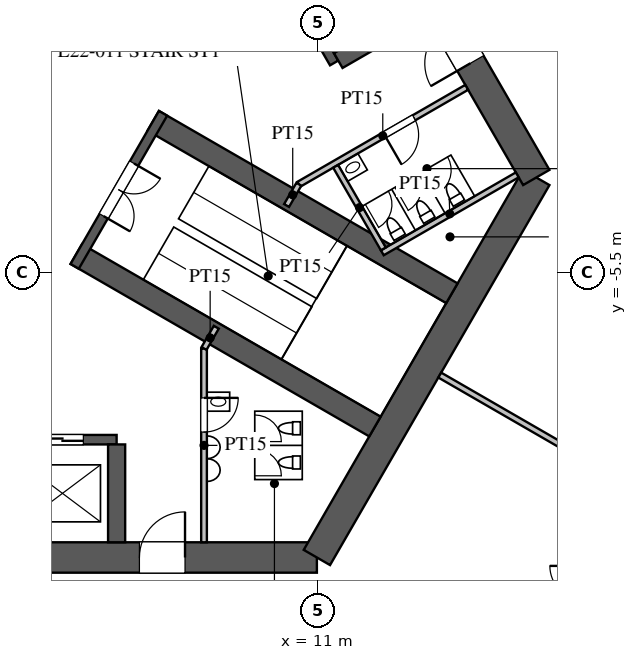
"""IFC4 building model, lengths in metres.
Left out: names, types, materials, properties, quantities, classifications, styles, units other than length and angle.
Written with IfcOpenShell. Run it as: python <this file> out.ifc"""

import sys

from ifc_helpers import new_model, si_unit, direction, frame, frame_2d, origin, place, context, subcontext, project, spatial, rectangle, extrude, element, fill, save


model = new_model("IFC4")
c1 = context("Model", 3, precision=1e-05, world=origin(), true_north=direction((0.0, 1.0)))
c2 = subcontext(c1, "Body", "Model", "MODEL_VIEW")
j1 = project(units=[si_unit("LENGTHUNIT", "METRE"), si_unit("PLANEANGLEUNIT", "RADIAN")], contexts=[c1])
p1 = place(None, origin())
s1 = spatial("IfcSite", under=j1, at=p1, CompositionType="ELEMENT")
p2 = place(p1, origin())
s2 = spatial("IfcBuilding", under=s1, at=p2, CompositionType="ELEMENT")
p3 = place(p2, frame((0.0, 0.0, 98.1)))
s3 = spatial("IfcBuildingStorey", under=s2, at=p3, CompositionType="ELEMENT", Elevation=98.1)
p4 = place(p3, frame((-10.97, -13.0, 0.0), z_axis=(0.0, 0.0, 1.0), x_axis=(1.0, 0.0, 0.0)))
e1 = element("IfcWall", 1, at=p4, inside=s3, PredefinedType="SHEAR", context=c2, shape_type="SweptSolid", body=[
    extrude(rectangle(XDim=21.939, YDim=0.8, at=frame_2d((10.97, 0.0))), origin(), (0.0, 0.0, 1.0), 5.0),
])
p5 = place(p4, frame((17.27, 0.0, 0.0)))
e2 = element("IfcOpeningElement", 2, at=p5, cuts=e1, PredefinedType="OPENING", context=c2, shape_type="SweptSolid", body=[
    extrude(rectangle(XDim=1.2, YDim=2.1, at=frame_2d((0.6, 1.05))), frame((0.0, 0.41, 0.0), z_axis=(0.0, -1.0, 0.0), x_axis=(1.0, 0.0, 0.0)), (0.0, 0.0, 1.0), 0.82),
])
p6 = place(p4, frame((3.47, 0.0, 0.0)))
e3 = element("IfcOpeningElement", 3, at=p6, cuts=e1, PredefinedType="OPENING", context=c2, shape_type="SweptSolid", body=[
    extrude(rectangle(XDim=1.2, YDim=2.1, at=frame_2d((0.6, 1.05))), frame((0.0, 0.41, 0.0), z_axis=(0.0, -1.0, 0.0), x_axis=(1.0, 0.0, 0.0)), (0.0, 0.0, 1.0), 0.82),
])
p7 = place(p3, frame((10.97, -13.0, 0.0), z_axis=(0.0, 0.0, 1.0), x_axis=(0.499995765644, 0.866027848477, 0.0)))
e4 = element("IfcWall", 4, at=p7, inside=s3, PredefinedType="SHEAR", context=c2, shape_type="SweptSolid", body=[
    extrude(rectangle(XDim=11.547, YDim=0.8, at=frame_2d((5.773, 0.0))), origin(), (0.0, 0.0, 1.0), 5.0),
])
p8 = place(p3, frame((16.743, -3.0, 0.0), z_axis=(0.0, 0.0, 1.0), x_axis=(-0.500002442456, 0.866023993627, 0.0)))
e5 = element("IfcWall", 5, at=p8, inside=s3, PredefinedType="SHEAR", context=c2, shape_type="SweptSolid", body=[
    extrude(rectangle(XDim=21.939, YDim=0.8, at=frame_2d((10.97, 0.0))), origin(), (0.0, 0.0, 1.0), 5.0),
])
p9 = place(p8, frame((17.27, 0.0, 0.0)))
e6 = element("IfcOpeningElement", 6, at=p9, cuts=e5, PredefinedType="OPENING", context=c2, shape_type="SweptSolid", body=[
    extrude(rectangle(XDim=1.2, YDim=2.1, at=frame_2d((0.6, 1.05))), frame((0.0, 0.41, 0.0), z_axis=(0.0, -1.0, 0.0), x_axis=(1.0, 0.0, 0.0)), (0.0, 0.0, 1.0), 0.82),
])
p10 = place(p8, frame((3.47, 0.0, 0.0)))
e7 = element("IfcOpeningElement", 7, at=p10, cuts=e5, PredefinedType="OPENING", context=c2, shape_type="SweptSolid", body=[
    extrude(rectangle(XDim=1.2, YDim=2.1, at=frame_2d((0.6, 1.05))), frame((0.0, 0.41, 0.0), z_axis=(0.0, -1.0, 0.0), x_axis=(1.0, 0.0, 0.0)), (0.0, 0.0, 1.0), 0.82),
])
p11 = place(p3, frame((-5.7, -9.9, 0.0), z_axis=(0.0, 0.0, 1.0), x_axis=(1.0, 0.0, 0.0)))
e8 = element("IfcWall", 8, at=p11, inside=s3, PredefinedType="SHEAR", context=c2, shape_type="SweptSolid", body=[
    extrude(rectangle(XDim=11.4, YDim=0.25, at=frame_2d((5.7, 0.0))), origin(), (0.0, 0.0, 1.0), 5.0),
])
p12 = place(p11, frame((0.875, 0.0, 0.0)))
e9 = element("IfcOpeningElement", 9, at=p12, cuts=e8, PredefinedType="OPENING", context=c2, shape_type="SweptSolid", body=[
    extrude(rectangle(XDim=1.1, YDim=2.2, at=frame_2d((0.55, 1.1))), frame((0.0, 0.135, 0.0), z_axis=(0.0, -1.0, 0.0), x_axis=(1.0, 0.0, 0.0)), (0.0, 0.0, 1.0), 0.27),
])
p13 = place(p11, frame((3.725, 0.0, 0.0)))
e10 = element("IfcOpeningElement", 10, at=p13, cuts=e8, PredefinedType="OPENING", context=c2, shape_type="SweptSolid", body=[
    extrude(rectangle(XDim=1.1, YDim=2.2, at=frame_2d((0.55, 1.1))), frame((0.0, 0.135, 0.0), z_axis=(0.0, -1.0, 0.0), x_axis=(1.0, 0.0, 0.0)), (0.0, 0.0, 1.0), 0.27),
])
p14 = place(p11, frame((6.575, 0.0, 0.0)))
e11 = element("IfcOpeningElement", 11, at=p14, cuts=e8, PredefinedType="OPENING", context=c2, shape_type="SweptSolid", body=[
    extrude(rectangle(XDim=1.1, YDim=2.2, at=frame_2d((0.55, 1.1))), frame((0.0, 0.135, 0.0), z_axis=(0.0, -1.0, 0.0), x_axis=(1.0, 0.0, 0.0)), (0.0, 0.0, 1.0), 0.27),
])
p15 = place(p11, frame((9.425, 0.0, 0.0)))
e12 = element("IfcOpeningElement", 12, at=p15, cuts=e8, PredefinedType="OPENING", context=c2, shape_type="SweptSolid", body=[
    extrude(rectangle(XDim=1.1, YDim=2.2, at=frame_2d((0.55, 1.1))), frame((0.0, 0.135, 0.0), z_axis=(0.0, -1.0, 0.0), x_axis=(1.0, 0.0, 0.0)), (0.0, 0.0, 1.0), 0.27),
])
p16 = place(p3, frame((5.7, -10.025, 0.0), z_axis=(0.0, 0.0, 1.0), x_axis=(0.0, -1.0, 0.0)))
e13 = element("IfcWall", 13, at=p16, inside=s3, PredefinedType="SHEAR", context=c2, shape_type="SweptSolid", body=[
    extrude(rectangle(XDim=2.575, YDim=0.45, at=frame_2d((1.288, 0.0))), origin(), (0.0, 0.0, 1.0), 5.0),
])
p17 = place(p3, frame((11.424, 0.014, 0.0), z_axis=(0.0, 0.0, 1.0), x_axis=(-0.500001763848, 0.866024385424, 0.0)))
e14 = element("IfcWall", 14, at=p17, inside=s3, PredefinedType="SHEAR", context=c2, shape_type="SweptSolid", body=[
    extrude(rectangle(XDim=11.4, YDim=0.25, at=frame_2d((5.7, 0.0))), origin(), (0.0, 0.0, 1.0), 5.0),
])
p18 = place(p17, frame((0.875, 0.0, 0.0)))
e15 = element("IfcOpeningElement", 15, at=p18, cuts=e14, PredefinedType="OPENING", context=c2, shape_type="SweptSolid", body=[
    extrude(rectangle(XDim=1.1, YDim=2.2, at=frame_2d((0.55, 1.1))), frame((0.0, 0.135, 0.0), z_axis=(0.0, -1.0, 0.0), x_axis=(1.0, 0.0, 0.0)), (0.0, 0.0, 1.0), 0.27),
])
p19 = place(p17, frame((3.725, 0.0, 0.0)))
e16 = element("IfcOpeningElement", 16, at=p19, cuts=e14, PredefinedType="OPENING", context=c2, shape_type="SweptSolid", body=[
    extrude(rectangle(XDim=1.1, YDim=2.2, at=frame_2d((0.55, 1.1))), frame((0.0, 0.135, 0.0), z_axis=(0.0, -1.0, 0.0), x_axis=(1.0, 0.0, 0.0)), (0.0, 0.0, 1.0), 0.27),
])
p20 = place(p3, frame((11.532, 0.076, 0.0), z_axis=(0.0, 0.0, 1.0), x_axis=(0.866005588531, 0.500034319456, 0.0)))
e17 = element("IfcWall", 17, at=p20, inside=s3, PredefinedType="SHEAR", context=c2, shape_type="SweptSolid", body=[
    extrude(rectangle(XDim=2.575, YDim=0.45, at=frame_2d((1.288, 0.0))), origin(), (0.0, 0.0, 1.0), 5.0),
])
for number, where, z_axis, x_axis in (
    (18, (4.638, -5.016, 0.0), (0.0, 0.0, 1.0), (0.866, -0.5, 0.0)),
    (19, (6.663, -1.509, 0.0), (0.0, 0.0, 1.0), (0.866, -0.5, 0.0)),
):
    element("IfcWall", number, at=place(p3, frame(where, z_axis=z_axis, x_axis=x_axis)), inside=s3, PredefinedType="SHEAR", context=c2, shape_type="SweptSolid", body=[
        extrude(rectangle(XDim=9.075, YDim=0.6, at=frame_2d((4.538, 0.0))), origin(), (0.0, 0.0, 1.0), 5.0),
    ])
p21 = place(p3, frame((4.597, -5.339, 0.0), z_axis=(0.0, 0.0, 1.0), x_axis=(0.499984536904, 0.866034331223, 0.0)))
e20 = element("IfcWall", 20, at=p21, inside=s3, PredefinedType="SHEAR", context=c2, shape_type="SweptSolid", body=[
    extrude(rectangle(XDim=4.65, YDim=0.25, at=frame_2d((2.325, 0.0))), origin(), (0.0, 0.0, 1.0), 5.0),
])
p22 = place(p21, frame((1.525, 0.0, 0.0)))
e21 = element("IfcOpeningElement", 21, at=p22, cuts=e20, PredefinedType="OPENING", context=c2, shape_type="SweptSolid", body=[
    extrude(rectangle(XDim=1.6, YDim=2.1, at=frame_2d((0.8, 1.05))), frame((0.0, 0.135, 0.0), z_axis=(0.0, -1.0, 0.0), x_axis=(1.0, 0.0, 0.0)), (0.0, 0.0, 1.0), 0.27),
])
p23 = place(p3, frame((8.0, -7.5, 0.0), z_axis=(0.0, 0.0, 1.0), x_axis=(0.0, -1.0, 0.0)))
e22 = element("IfcWall", 22, at=p23, inside=s3, PredefinedType="PARTITIONING", context=c2, shape_type="SweptSolid", body=[
    extrude(rectangle(XDim=5.1, YDim=0.15, at=frame_2d((2.55, 0.0))), origin(), (0.0, 0.0, 1.0), 4.8),
])
p24 = place(p23, frame((1.3, 0.0, 0.0)))
e23 = element("IfcOpeningElement", 23, at=p24, cuts=e22, PredefinedType="OPENING", context=c2, shape_type="SweptSolid", body=[
    extrude(rectangle(XDim=0.9, YDim=2.1, at=frame_2d((0.45, 1.05))), frame((0.0, 0.085, 0.0), z_axis=(0.0, -1.0, 0.0), x_axis=(1.0, 0.0, 0.0)), (0.0, 0.0, 1.0), 0.17),
])
p25 = place(p3, frame((10.495, -3.178, 0.0), z_axis=(0.0, 0.0, 1.0), x_axis=(0.86602216432, 0.500005610874, 0.0)))
e24 = element("IfcWall", 24, at=p25, inside=s3, PredefinedType="PARTITIONING", context=c2, shape_type="SweptSolid", body=[
    extrude(rectangle(XDim=5.1, YDim=0.15, at=frame_2d((2.55, 0.0))), origin(), (0.0, 0.0, 1.0), 4.8),
])
p26 = place(p25, frame((2.6, 0.0, 0.0)))
e25 = element("IfcOpeningElement", 25, at=p26, cuts=e24, PredefinedType="OPENING", context=c2, shape_type="SweptSolid", body=[
    extrude(rectangle(XDim=0.9, YDim=2.1, at=frame_2d((0.45, 1.05))), frame((0.0, 0.085, 0.0), z_axis=(0.0, -1.0, 0.0), x_axis=(1.0, 0.0, 0.0)), (0.0, 0.0, 1.0), 0.17),
])
for number, where, z_axis, x_axis in (
    (26, (8.0, -7.5, 0.0), (0.0, 0.0, 1.0), (0.5, 0.866, 0.0)),
    (27, (10.495, -3.178, 0.0), (0.0, 0.0, 1.0), (-0.5, -0.866, 0.0)),
):
    element("IfcWall", number, at=place(p3, frame(where, z_axis=z_axis, x_axis=x_axis)), inside=s3, PredefinedType="PARTITIONING", context=c2, shape_type="SweptSolid", body=[
        extrude(rectangle(XDim=0.645, YDim=0.15, at=frame_2d((0.323, 0.0))), origin(), (0.0, 0.0, 1.0), 4.8),
    ])
p27 = place(p3, frame((12.691, -4.982, 0.0), z_axis=(0.0, 0.0, 1.0), x_axis=(0.8660249478, 0.500000789788, 0.0)))
e28 = element("IfcWall", 28, at=p27, inside=s3, PredefinedType="PARTITIONING", context=c2, shape_type="SweptSolid", body=[
    extrude(rectangle(XDim=4.1, YDim=0.15, at=frame_2d((2.05, 0.0))), origin(), (0.0, 0.0, 1.0), 4.8),
])
p28 = place(p3, frame((11.464, -2.706, 0.0), z_axis=(0.0, 0.0, 1.0), x_axis=(0.50001992892, -0.866013897511, 0.0)))
e29 = element("IfcWall", 29, at=p28, inside=s3, PredefinedType="PARTITIONING", context=c2, shape_type="SweptSolid", body=[
    extrude(rectangle(XDim=2.51, YDim=0.15, at=frame_2d((1.255, 0.0))), origin(), (0.0, 0.0, 1.0), 4.8),
])
p29 = place(p3, frame((14.203, -8.2, 0.0), z_axis=(0.0, 0.0, 1.0), x_axis=(0.866024668836, -0.500001272966, 0.0)))
e30 = element("IfcWall", 30, at=p29, inside=s3, PredefinedType="PARTITIONING", context=c2, shape_type="SweptSolid", body=[
    extrude(rectangle(XDim=16.65, YDim=0.15, at=frame_2d((8.325, 0.0))), origin(), (0.0, 0.0, 1.0), 3.1),
])
p30 = place(p24, origin())
e31 = element("IfcDoor", 31, at=p30, inside=s3, OperationType="SINGLE_SWING_LEFT", PredefinedType="DOOR", context=c2, shape_type="SweptSolid", body=[
    extrude(rectangle(XDim=0.9, YDim=2.1, at=frame_2d((0.45, 1.05))), frame((0.0, 0.025, 0.0), z_axis=(0.0, -1.0, 0.0), x_axis=(1.0, 0.0, 0.0)), (0.0, 0.0, 1.0), 0.05),
])
fill(e23, e31)
p31 = place(p26, frame((0.9, 0.0, 0.0), z_axis=(0.0, 0.0, 1.0), x_axis=(-1.0, 0.0, 0.0)))
e32 = element("IfcDoor", 32, at=p31, inside=s3, OperationType="SINGLE_SWING_RIGHT", PredefinedType="DOOR", context=c2, shape_type="SweptSolid", body=[
    extrude(rectangle(XDim=0.9, YDim=2.1, at=frame_2d((0.45, 1.05))), frame((0.0, 0.025, 0.0), z_axis=(0.0, -1.0, 0.0), x_axis=(1.0, 0.0, 0.0)), (0.0, 0.0, 1.0), 0.05),
])
fill(e25, e32)
p32 = place(p22, frame((1.6, 0.0, 0.0), z_axis=(0.0, 0.0, 1.0), x_axis=(-1.0, 0.0, 0.0)))
e33 = element("IfcDoor", 33, at=p32, inside=s3, OperationType="DOUBLE_DOOR_SINGLE_SWING", PredefinedType="DOOR", context=c2, shape_type="SweptSolid", body=[
    extrude(rectangle(XDim=1.6, YDim=2.1, at=frame_2d((0.8, 1.05))), frame((0.0, 0.025, 0.0), z_axis=(0.0, -1.0, 0.0), x_axis=(1.0, 0.0, 0.0)), (0.0, 0.0, 1.0), 0.05),
])
fill(e21, e33)
p33 = place(p5, origin())
e34 = element("IfcDoor", 34, at=p33, inside=s3, OperationType="SINGLE_SWING_RIGHT", PredefinedType="DOOR", context=c2, shape_type="SweptSolid", body=[
    extrude(rectangle(XDim=1.2, YDim=2.1, at=frame_2d((0.6, 1.05))), frame((0.0, 0.025, 0.0), z_axis=(0.0, -1.0, 0.0), x_axis=(1.0, 0.0, 0.0)), (0.0, 0.0, 1.0), 0.05),
])
fill(e2, e34)
p34 = place(p10, origin())
e35 = element("IfcDoor", 35, at=p34, inside=s3, OperationType="SINGLE_SWING_LEFT", PredefinedType="DOOR", context=c2, shape_type="SweptSolid", body=[
    extrude(rectangle(XDim=1.2, YDim=2.1, at=frame_2d((0.6, 1.05))), frame((0.0, 0.025, 0.0), z_axis=(0.0, -1.0, 0.0), x_axis=(1.0, 0.0, 0.0)), (0.0, 0.0, 1.0), 0.05),
])
fill(e7, e35)
p35 = place(p15, origin())
e36 = element("IfcDoor", 36, at=p35, inside=s3, OperationType="DOUBLE_DOOR_SLIDING", PredefinedType="DOOR", context=c2, shape_type="SweptSolid", body=[
    extrude(rectangle(XDim=1.1, YDim=2.2, at=frame_2d((0.55, 1.1))), frame((0.0, 0.025, 0.0), z_axis=(0.0, -1.0, 0.0), x_axis=(1.0, 0.0, 0.0)), (0.0, 0.0, 1.0), 0.05),
])
fill(e12, e36)
save(model, sys.argv[1])
